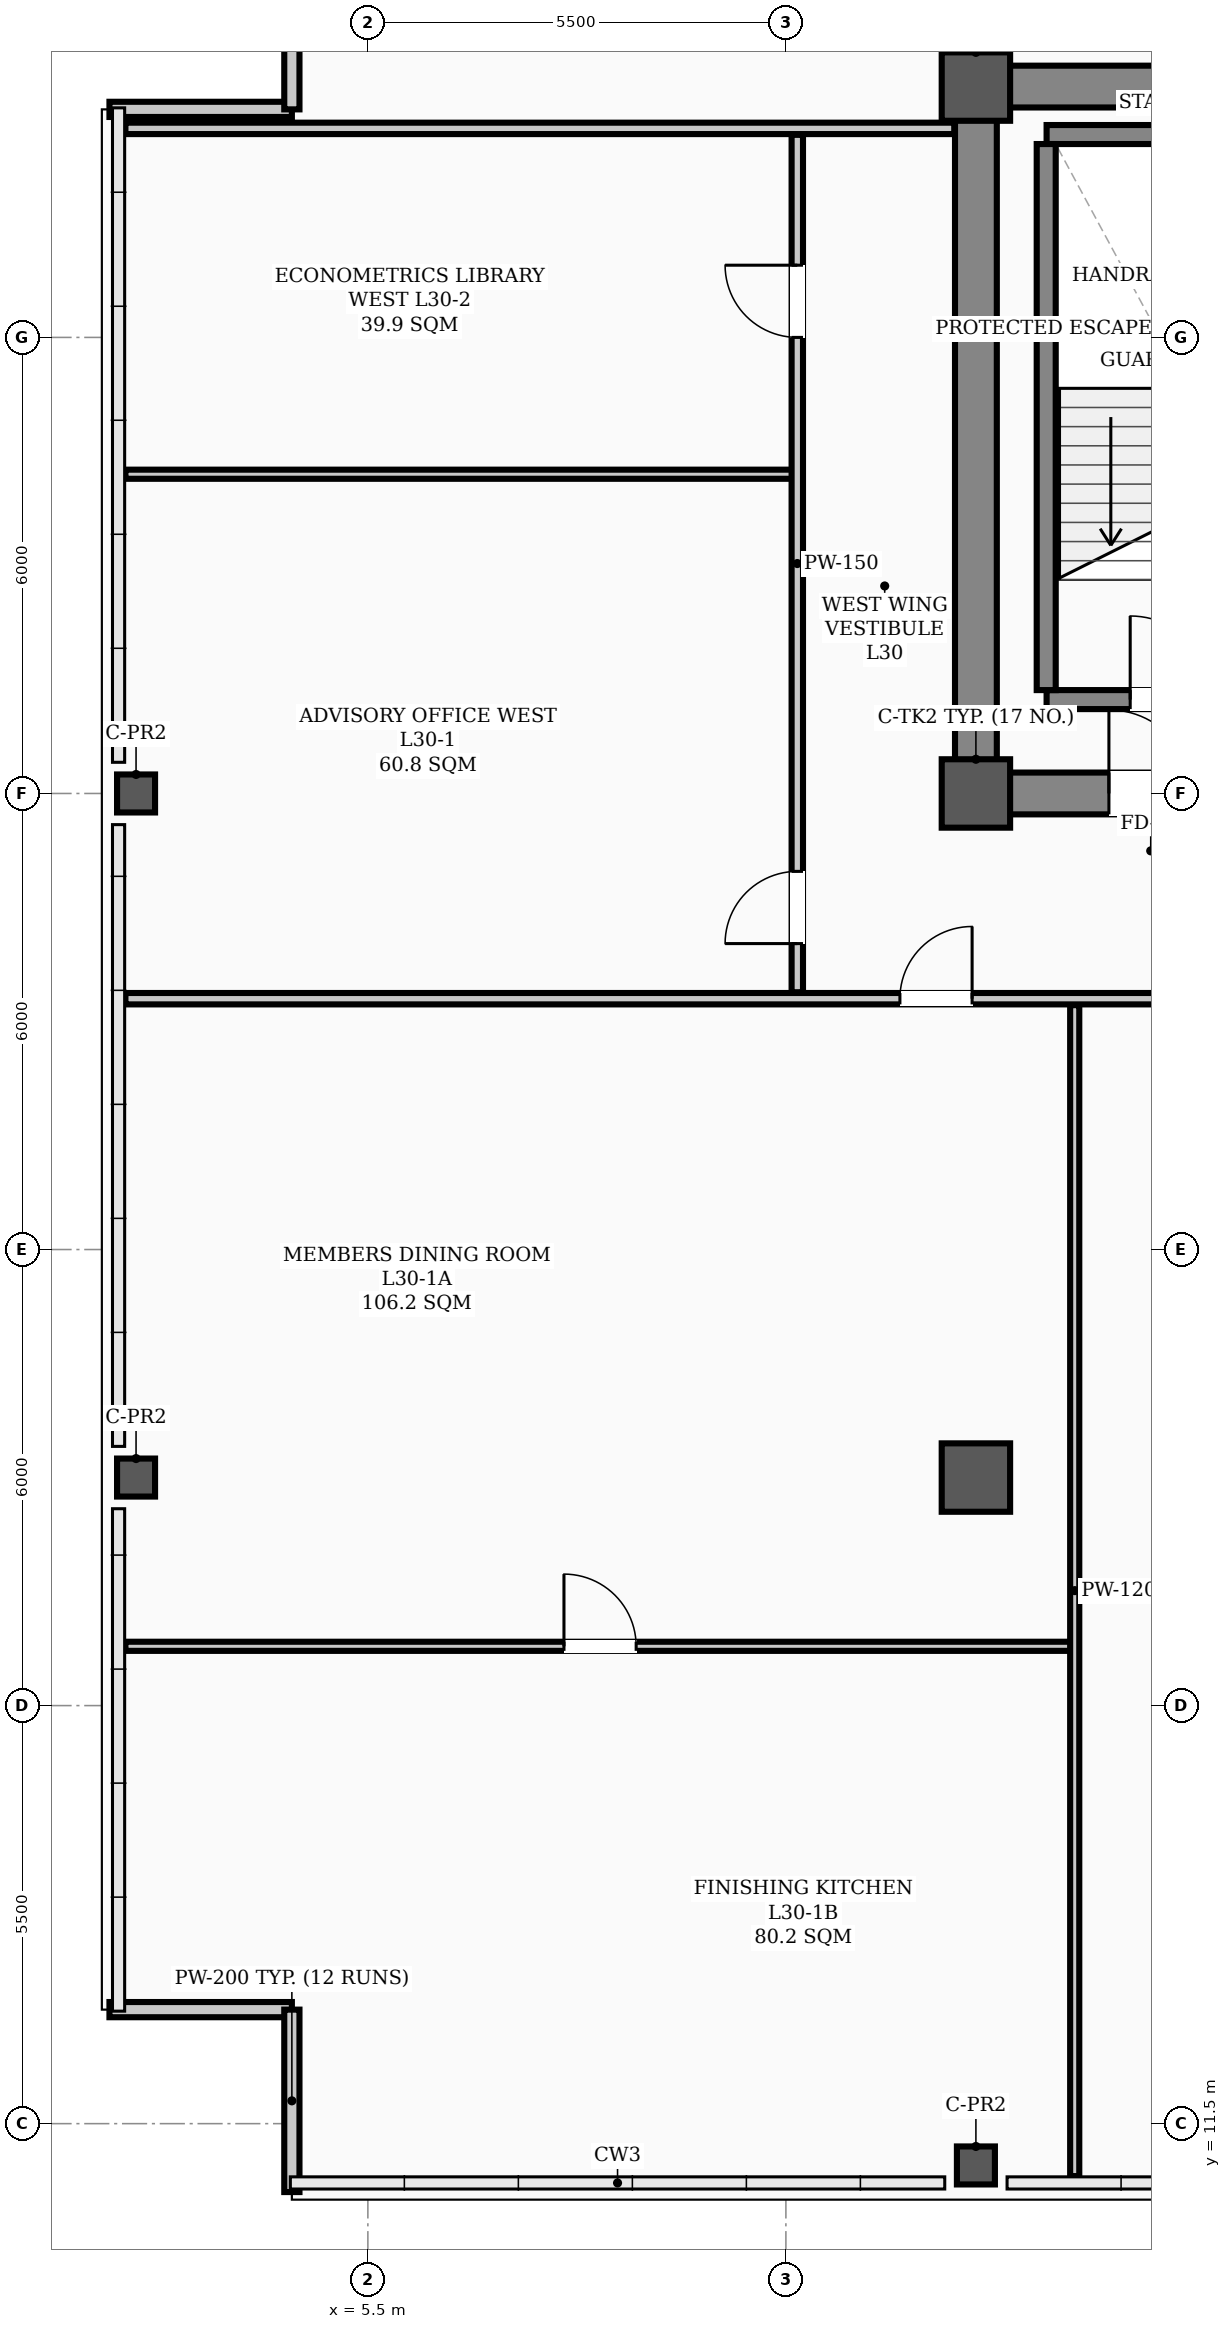
"""IFC4 building model, lengths in metres.
Left out: names, types, materials, properties, quantities, classifications, styles, units other than length and angle.
Written with IfcOpenShell. Run it as: python <this file> out.ifc"""

import sys

from ifc_helpers import new_model, si_unit, direction, frame, frame_2d, origin, origin_2d, place, context, subcontext, project, spatial, rectangle, hollow_rectangle, extrude, element, fill, save


model = new_model("IFC4")
c1 = context("Model", 3, precision=1e-05, world=origin(), true_north=direction((0.0, 1.0)))
c2 = subcontext(c1, "Body", "Model", "MODEL_VIEW")
j1 = project(units=[si_unit("LENGTHUNIT", "METRE"), si_unit("PLANEANGLEUNIT", "RADIAN")], contexts=[c1])
p1 = place(None, origin())
s1 = spatial("IfcSite", under=j1, at=p1, CompositionType="ELEMENT")
p2 = place(p1, origin())
s2 = spatial("IfcBuilding", under=s1, at=p2, CompositionType="ELEMENT")
p3 = place(p2, frame((0.0, 0.0, 122.7)))
s3 = spatial("IfcBuildingStorey", under=s2, at=p3, CompositionType="ELEMENT", Elevation=122.7)
for number, where, z_axis, x_axis in (
    (1, (13.5, 29.0, 0.0), (0.0, 0.0, 1.0), (1.0, 0.0, 0.0)),
    (2, (13.5, 38.3, 0.0), (0.0, 0.0, 1.0), (1.0, 0.0, 0.0)),
    (3, (13.5, 20.0, 0.0), (0.0, 0.0, 1.0), (1.0, 0.0, 0.0)),
):
    element("IfcColumn", number, at=place(p3, frame(where, z_axis=z_axis, x_axis=x_axis)), inside=s3, PredefinedType="COLUMN", context=c2, shape_type="SweptSolid", body=[
        extrude(hollow_rectangle(XDim=0.9, YDim=0.9, WallThickness=0.035, InnerFilletRadius=0.017, OuterFilletRadius=0.052, at=origin_2d()), origin(), (0.0, 0.0, 1.0), 3.9),
    ])
for number, where, z_axis, x_axis in (
    (4, (2.45, 20.0, 0.0), (0.0, 0.0, 1.0), (1.0, 0.0, 0.0)),
    (5, (2.45, 29.0, 0.0), (0.0, 0.0, 1.0), (1.0, 0.0, 0.0)),
    (6, (13.5, 10.95, 0.0), (0.0, 0.0, 1.0), (1.0, 0.0, 0.0)),
):
    element("IfcColumn", number, at=place(p3, frame(where, z_axis=z_axis, x_axis=x_axis)), inside=s3, PredefinedType="COLUMN", context=c2, shape_type="SweptSolid", body=[
        extrude(hollow_rectangle(XDim=0.5, YDim=0.5, WallThickness=0.024, InnerFilletRadius=0.012, OuterFilletRadius=0.036, at=origin_2d()), origin(), (0.0, 0.0, 1.0), 3.9),
    ])
for number, where, z_axis, x_axis in (
    (7, (2.1, 13.0, 0.0), (0.0, 0.0, 1.0), (1.0, 0.0, 0.0)),
    (8, (4.5, 13.0, 0.0), (0.0, 0.0, 1.0), (0.0, -1.0, 0.0)),
    (9, (2.1, 38.0, 0.0), (0.0, 0.0, 1.0), (1.0, 0.0, 0.0)),
    (10, (4.5, 38.0, 0.0), (0.0, 0.0, 1.0), (0.0, 1.0, 0.0)),
):
    element("IfcWall", number, at=place(p3, frame(where, z_axis=z_axis, x_axis=x_axis)), inside=s3, PredefinedType="PARAPET", context=c2, shape_type="SweptSolid", body=[
        extrude(rectangle(XDim=2.4, YDim=0.2, at=frame_2d((1.2, 0.0))), origin(), (0.0, 0.0, 1.0), 1.2),
    ])
p4 = place(p3, frame((13.5, 29.0, 0.0), z_axis=(0.0, 0.0, 1.0), x_axis=(1.0, 0.0, 0.0)))
e11 = element("IfcWall", 11, at=p4, inside=s3, PredefinedType="SHEAR", context=c2, shape_type="SweptSolid", body=[
    extrude(rectangle(XDim=30.5, YDim=0.55, at=frame_2d((15.25, 0.0))), origin(), (0.0, 0.0, 1.0), 3.72),
])
p5 = place(p4, frame((1.75, 0.0, 0.0)))
e12 = element("IfcOpeningElement", 12, at=p5, cuts=e11, PredefinedType="OPENING", context=c2, shape_type="SweptSolid", body=[
    extrude(rectangle(XDim=1.1, YDim=2.08, at=frame_2d((0.55, 1.04))), frame((0.0, 0.285, 0.0), z_axis=(0.0, -1.0, 0.0), x_axis=(1.0, 0.0, 0.0)), (0.0, 0.0, 1.0), 0.57),
])
p6 = place(p4, frame((26.7, 0.0, 0.0)))
e13 = element("IfcOpeningElement", 13, at=p6, cuts=e11, PredefinedType="OPENING", context=c2, shape_type="SweptSolid", body=[
    extrude(rectangle(XDim=1.1, YDim=2.08, at=frame_2d((0.55, 1.04))), frame((0.0, 0.285, 0.0), z_axis=(0.0, -1.0, 0.0), x_axis=(1.0, 0.0, 0.0)), (0.0, 0.0, 1.0), 0.57),
])
p7 = place(p4, frame((6.8, 0.0, 0.0)))
e14 = element("IfcOpeningElement", 14, at=p7, cuts=e11, PredefinedType="OPENING", context=c2, shape_type="SweptSolid", body=[
    extrude(rectangle(XDim=1.1, YDim=2.08, at=frame_2d((0.55, 1.04))), frame((0.0, 0.285, 0.0), z_axis=(0.0, -1.0, 0.0), x_axis=(1.0, 0.0, 0.0)), (0.0, 0.0, 1.0), 0.57),
])
p8 = place(p4, frame((13.2, 0.0, 0.0)))
e15 = element("IfcOpeningElement", 15, at=p8, cuts=e11, PredefinedType="OPENING", context=c2, shape_type="SweptSolid", body=[
    extrude(rectangle(XDim=1.6, YDim=2.08, at=frame_2d((0.8, 1.04))), frame((0.0, 0.285, 0.0), z_axis=(0.0, -1.0, 0.0), x_axis=(1.0, 0.0, 0.0)), (0.0, 0.0, 1.0), 0.57),
])
p9 = place(p4, frame((20.525, 0.0, 0.0)))
e16 = element("IfcOpeningElement", 16, at=p9, cuts=e11, PredefinedType="OPENING", context=c2, shape_type="SweptSolid", body=[
    extrude(rectangle(XDim=0.95, YDim=2.08, at=frame_2d((0.475, 1.04))), frame((0.0, 0.285, 0.0), z_axis=(0.0, -1.0, 0.0), x_axis=(1.0, 0.0, 0.0)), (0.0, 0.0, 1.0), 0.57),
])
p10 = place(p3, frame((13.5, 38.3, 0.0), z_axis=(0.0, 0.0, 1.0), x_axis=(1.0, 0.0, 0.0)))
e17 = element("IfcWall", 17, at=p10, inside=s3, PredefinedType="SHEAR", context=c2, shape_type="SweptSolid", body=[
    extrude(rectangle(XDim=30.5, YDim=0.55, at=frame_2d((15.25, 0.0))), origin(), (0.0, 0.0, 1.0), 3.72),
])
p11 = place(p3, frame((13.5, 29.35, 0.0), z_axis=(0.0, 0.0, 1.0), x_axis=(0.0, 1.0, 0.0)))
e18 = element("IfcWall", 18, at=p11, inside=s3, PredefinedType="SHEAR", context=c2, shape_type="SweptSolid", body=[
    extrude(rectangle(XDim=8.6, YDim=0.55, at=frame_2d((4.3, 0.0))), origin(), (0.0, 0.0, 1.0), 3.72),
])
p12 = place(p3, frame((14.43, 30.235, 0.0), z_axis=(0.0, 0.0, 1.0), x_axis=(1.0, 0.0, 0.0)))
e19 = element("IfcWall", 19, at=p12, inside=s3, PredefinedType="STANDARD", context=c2, shape_type="SweptSolid", body=[
    extrude(rectangle(XDim=3.34, YDim=0.25, at=frame_2d((1.67, 0.0))), origin(), (0.0, 0.0, 1.0), 3.72),
])
p13 = place(p12, frame((1.1, 0.0, 0.0)))
e20 = element("IfcOpeningElement", 20, at=p13, cuts=e19, PredefinedType="OPENING", context=c2, shape_type="SweptSolid", body=[
    extrude(rectangle(XDim=1.1, YDim=2.08, at=frame_2d((0.55, 1.04))), frame((0.0, 0.135, 0.0), z_axis=(0.0, -1.0, 0.0), x_axis=(1.0, 0.0, 0.0)), (0.0, 0.0, 1.0), 0.27),
])
p14 = place(p3, frame((14.43, 37.669, 0.0), z_axis=(0.0, 0.0, 1.0), x_axis=(1.0, 0.0, 0.0)))
e21 = element("IfcWall", 21, at=p14, inside=s3, PredefinedType="STANDARD", context=c2, shape_type="SweptSolid", body=[
    extrude(rectangle(XDim=3.34, YDim=0.25, at=frame_2d((1.67, 0.0))), origin(), (0.0, 0.0, 1.0), 3.72),
])
p15 = place(p3, frame((14.425, 30.36, 0.0), z_axis=(0.0, 0.0, 1.0), x_axis=(0.0, 1.0, 0.0)))
e22 = element("IfcWall", 22, at=p15, inside=s3, PredefinedType="STANDARD", context=c2, shape_type="SweptSolid", body=[
    extrude(rectangle(XDim=7.184, YDim=0.25, at=frame_2d((3.592, 0.0))), origin(), (0.0, 0.0, 1.0), 3.72),
])
p16 = place(p3, frame((2.31, 26.3, 0.0), z_axis=(0.0, 0.0, 1.0), x_axis=(1.0, 0.0, 0.0)))
e23 = element("IfcWall", 23, at=p16, inside=s3, PredefinedType="PARTITIONING", context=c2, shape_type="SweptSolid", body=[
    extrude(rectangle(XDim=46.38, YDim=0.15, at=frame_2d((23.19, 0.0))), origin(), (0.0, 0.0, 1.0), 3.1),
])
p17 = place(p16, frame((10.19, 0.0, 0.0)))
e24 = element("IfcOpeningElement", 24, at=p17, cuts=e23, PredefinedType="OPENING", context=c2, shape_type="SweptSolid", body=[
    extrude(rectangle(XDim=0.95, YDim=2.08, at=frame_2d((0.475, 1.04))), frame((0.0, 0.085, 0.0), z_axis=(0.0, -1.0, 0.0), x_axis=(1.0, 0.0, 0.0)), (0.0, 0.0, 1.0), 0.17),
])
p18 = place(p16, frame((15.915, 0.0, 0.0)))
e25 = element("IfcOpeningElement", 25, at=p18, cuts=e23, PredefinedType="OPENING", context=c2, shape_type="SweptSolid", body=[
    extrude(rectangle(XDim=0.95, YDim=2.08, at=frame_2d((0.475, 1.04))), frame((0.0, 0.085, 0.0), z_axis=(0.0, -1.0, 0.0), x_axis=(1.0, 0.0, 0.0)), (0.0, 0.0, 1.0), 0.17),
])
p19 = place(p16, frame((24.115, 0.0, 0.0)))
e26 = element("IfcOpeningElement", 26, at=p19, cuts=e23, PredefinedType="OPENING", context=c2, shape_type="SweptSolid", body=[
    extrude(rectangle(XDim=0.95, YDim=2.08, at=frame_2d((0.475, 1.04))), frame((0.0, 0.085, 0.0), z_axis=(0.0, -1.0, 0.0), x_axis=(1.0, 0.0, 0.0)), (0.0, 0.0, 1.0), 0.17),
])
p20 = place(p16, frame((32.515, 0.0, 0.0)))
e27 = element("IfcOpeningElement", 27, at=p20, cuts=e23, PredefinedType="OPENING", context=c2, shape_type="SweptSolid", body=[
    extrude(rectangle(XDim=0.95, YDim=2.08, at=frame_2d((0.475, 1.04))), frame((0.0, 0.085, 0.0), z_axis=(0.0, -1.0, 0.0), x_axis=(1.0, 0.0, 0.0)), (0.0, 0.0, 1.0), 0.17),
])
p21 = place(p16, frame((37.665, 0.0, 0.0)))
e28 = element("IfcOpeningElement", 28, at=p21, cuts=e23, PredefinedType="OPENING", context=c2, shape_type="SweptSolid", body=[
    extrude(rectangle(XDim=0.95, YDim=2.08, at=frame_2d((0.475, 1.04))), frame((0.0, 0.085, 0.0), z_axis=(0.0, -1.0, 0.0), x_axis=(1.0, 0.0, 0.0)), (0.0, 0.0, 1.0), 0.17),
])
p22 = place(p3, frame((2.31, 37.75, 0.0), z_axis=(0.0, 0.0, 1.0), x_axis=(1.0, 0.0, 0.0)))
e29 = element("IfcWall", 29, at=p22, inside=s3, PredefinedType="PARTITIONING", context=c2, shape_type="SweptSolid", body=[
    extrude(rectangle(XDim=10.905, YDim=0.15, at=frame_2d((5.453, 0.0))), origin(), (0.0, 0.0, 1.0), 3.1),
])
p23 = place(p3, frame((2.31, 17.78, 0.0), z_axis=(0.0, 0.0, 1.0), x_axis=(1.0, 0.0, 0.0)))
e30 = element("IfcWall", 30, at=p23, inside=s3, PredefinedType="PARTITIONING", context=c2, shape_type="SweptSolid", body=[
    extrude(rectangle(XDim=12.49, YDim=0.12, at=frame_2d((6.245, 0.0))), origin(), (0.0, 0.0, 1.0), 3.1),
])
p24 = place(p23, frame((5.77, 0.0, 0.0)))
e31 = element("IfcOpeningElement", 31, at=p24, cuts=e30, PredefinedType="OPENING", context=c2, shape_type="SweptSolid", body=[
    extrude(rectangle(XDim=0.95, YDim=2.08, at=frame_2d((0.475, 1.04))), frame((0.0, 0.07, 0.0), z_axis=(0.0, -1.0, 0.0), x_axis=(1.0, 0.0, 0.0)), (0.0, 0.0, 1.0), 0.14),
])
p25 = place(p3, frame((2.31, 33.2, 0.0), z_axis=(0.0, 0.0, 1.0), x_axis=(1.0, 0.0, 0.0)))
e32 = element("IfcWall", 32, at=p25, inside=s3, PredefinedType="PARTITIONING", context=c2, shape_type="SweptSolid", body=[
    extrude(rectangle(XDim=8.84, YDim=0.12, at=frame_2d((4.42, 0.0))), origin(), (0.0, 0.0, 1.0), 3.72),
])
p26 = place(p3, frame((11.15, 26.385, 0.0), z_axis=(0.0, 0.0, 1.0), x_axis=(0.0, 1.0, 0.0)))
e33 = element("IfcWall", 33, at=p26, inside=s3, PredefinedType="PARTITIONING", context=c2, shape_type="SweptSolid", body=[
    extrude(rectangle(XDim=11.28, YDim=0.15, at=frame_2d((5.64, 0.0))), origin(), (0.0, 0.0, 1.0), 3.0),
])
p27 = place(p26, frame((0.64, 0.0, 0.0)))
e34 = element("IfcOpeningElement", 34, at=p27, cuts=e33, PredefinedType="OPENING", context=c2, shape_type="SweptSolid", body=[
    extrude(rectangle(XDim=0.95, YDim=2.08, at=frame_2d((0.475, 1.04))), frame((0.0, 0.085, 0.0), z_axis=(0.0, -1.0, 0.0), x_axis=(1.0, 0.0, 0.0)), (0.0, 0.0, 1.0), 0.17),
])
p28 = place(p26, frame((8.615, 0.0, 0.0)))
e35 = element("IfcOpeningElement", 35, at=p28, cuts=e33, PredefinedType="OPENING", context=c2, shape_type="SweptSolid", body=[
    extrude(rectangle(XDim=0.95, YDim=2.08, at=frame_2d((0.475, 1.04))), frame((0.0, 0.085, 0.0), z_axis=(0.0, -1.0, 0.0), x_axis=(1.0, 0.0, 0.0)), (0.0, 0.0, 1.0), 0.17),
])
p29 = place(p3, frame((14.8, 10.81, 0.0), z_axis=(0.0, 0.0, 1.0), x_axis=(0.0, 1.0, 0.0)))
e36 = element("IfcWall", 36, at=p29, inside=s3, PredefinedType="PARTITIONING", context=c2, shape_type="SweptSolid", body=[
    extrude(rectangle(XDim=15.405, YDim=0.12, at=frame_2d((7.703, 0.0))), origin(), (0.0, 0.0, 1.0), 3.0),
])
p30 = place(p13, origin())
e37 = element("IfcDoor", 37, at=p30, inside=s3, OperationType="SINGLE_SWING_LEFT", PredefinedType="DOOR", context=c2, shape_type="SweptSolid", body=[
    extrude(rectangle(XDim=1.1, YDim=2.08, at=frame_2d((0.55, 1.04))), frame((0.0, 0.025, 0.0), z_axis=(0.0, -1.0, 0.0), x_axis=(1.0, 0.0, 0.0)), (0.0, 0.0, 1.0), 0.05),
])
fill(e20, e37)
p31 = place(p5, origin())
e38 = element("IfcDoor", 38, at=p31, inside=s3, OperationType="SINGLE_SWING_LEFT", PredefinedType="DOOR", context=c2, shape_type="SweptSolid", body=[
    extrude(rectangle(XDim=1.1, YDim=2.08, at=frame_2d((0.55, 1.04))), frame((0.0, 0.025, 0.0), z_axis=(0.0, -1.0, 0.0), x_axis=(1.0, 0.0, 0.0)), (0.0, 0.0, 1.0), 0.05),
])
fill(e12, e38)
p32 = place(p24, origin())
e39 = element("IfcDoor", 39, at=p32, inside=s3, OperationType="SINGLE_SWING_LEFT", PredefinedType="DOOR", context=c2, shape_type="SweptSolid", body=[
    extrude(rectangle(XDim=0.95, YDim=2.08, at=frame_2d((0.475, 1.04))), frame((0.0, 0.025, 0.0), z_axis=(0.0, -1.0, 0.0), x_axis=(1.0, 0.0, 0.0)), (0.0, 0.0, 1.0), 0.05),
])
fill(e31, e39)
p33 = place(p17, origin())
e40 = element("IfcDoor", 40, at=p33, inside=s3, OperationType="SINGLE_SWING_RIGHT", PredefinedType="DOOR", context=c2, shape_type="SweptSolid", body=[
    extrude(rectangle(XDim=0.95, YDim=2.08, at=frame_2d((0.475, 1.04))), frame((0.0, 0.025, 0.0), z_axis=(0.0, -1.0, 0.0), x_axis=(1.0, 0.0, 0.0)), (0.0, 0.0, 1.0), 0.05),
])
fill(e24, e40)
p34 = place(p27, origin())
e41 = element("IfcDoor", 41, at=p34, inside=s3, OperationType="SINGLE_SWING_LEFT", PredefinedType="DOOR", context=c2, shape_type="SweptSolid", body=[
    extrude(rectangle(XDim=0.95, YDim=2.08, at=frame_2d((0.475, 1.04))), frame((0.0, 0.025, 0.0), z_axis=(0.0, -1.0, 0.0), x_axis=(1.0, 0.0, 0.0)), (0.0, 0.0, 1.0), 0.05),
])
fill(e34, e41)
p35 = place(p28, origin())
e42 = element("IfcDoor", 42, at=p35, inside=s3, OperationType="SINGLE_SWING_RIGHT", PredefinedType="DOOR", context=c2, shape_type="SweptSolid", body=[
    extrude(rectangle(XDim=0.95, YDim=2.08, at=frame_2d((0.475, 1.04))), frame((0.0, 0.025, 0.0), z_axis=(0.0, -1.0, 0.0), x_axis=(1.0, 0.0, 0.0)), (0.0, 0.0, 1.0), 0.05),
])
fill(e35, e42)
save(model, sys.argv[1])
